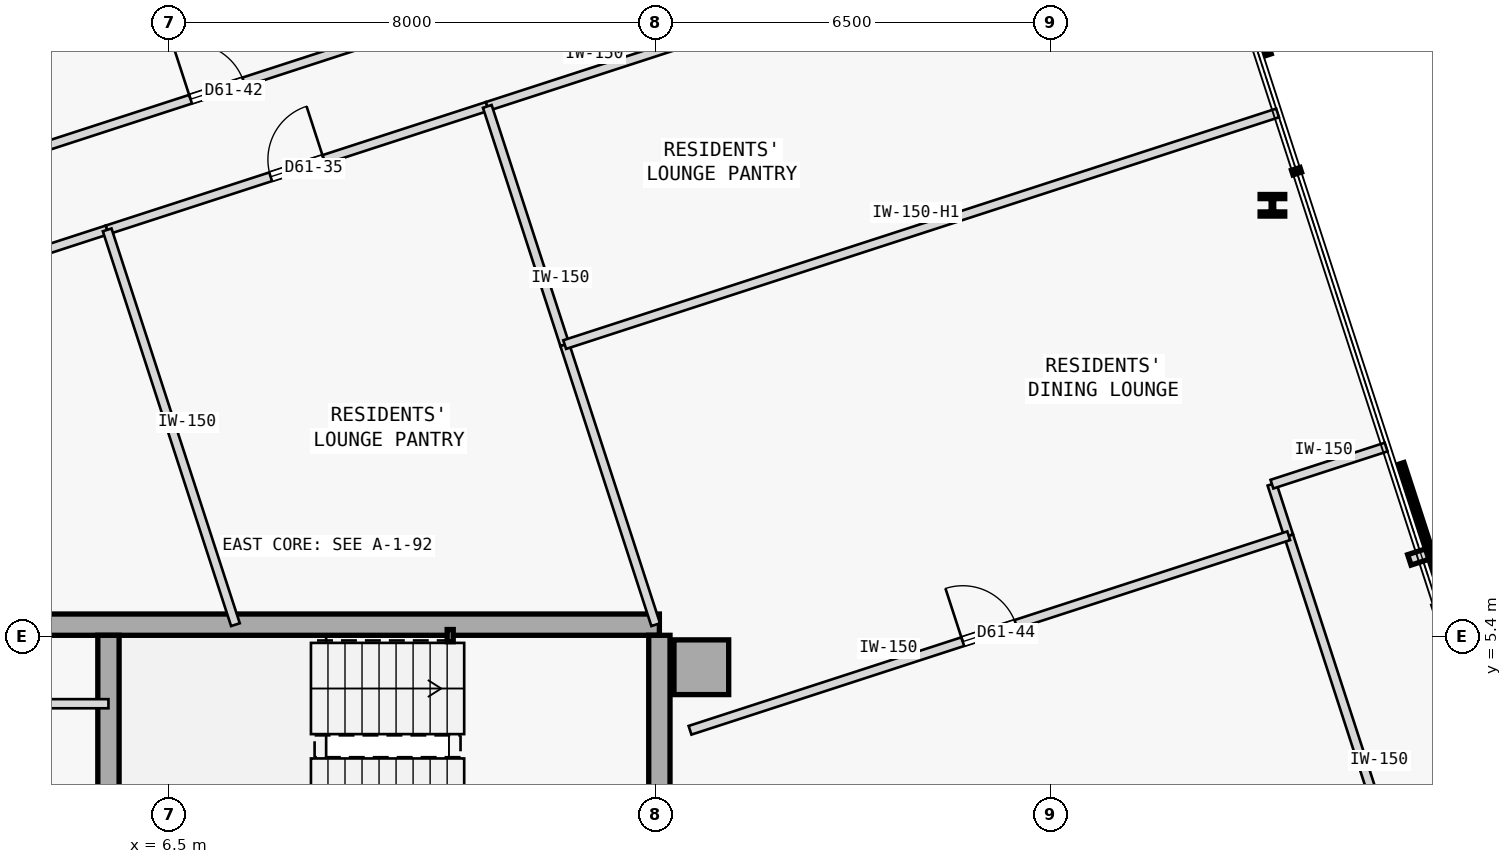
"""IFC4 building model, lengths in metres.
Left out: names, types, materials, properties, quantities, classifications, styles, units other than length and angle.
Written with IfcOpenShell. Run it as: python <this file> out.ifc"""

import sys

from ifc_helpers import new_model, si_unit, direction, frame, frame_2d, origin, origin_2d, place, context, subcontext, project, spatial, rectangle, hollow_rectangle, i_section, extrude, element, fill, save


model = new_model("IFC4")
c1 = context("Model", 3, precision=1e-05, world=origin(), true_north=direction((0.0, 1.0)))
c2 = subcontext(c1, "Body", "Model", "MODEL_VIEW")
j1 = project(units=[si_unit("LENGTHUNIT", "METRE"), si_unit("PLANEANGLEUNIT", "RADIAN")], contexts=[c1])
p1 = place(None, origin())
s1 = spatial("IfcSite", under=j1, at=p1, CompositionType="ELEMENT")
p2 = place(p1, origin())
s2 = spatial("IfcBuilding", under=s1, at=p2, CompositionType="ELEMENT")
p3 = place(p2, frame((0.0, 0.0, 231.0)))
s3 = spatial("IfcBuildingStorey", under=s2, at=p3, CompositionType="ELEMENT", Elevation=231.0)
p4 = place(p3, frame((15.25, 4.9, 0.0), z_axis=(0.0, 0.0, 1.0), x_axis=(1.0, 0.0, 0.0)))
e1 = element("IfcColumn", 1, at=p4, inside=s3, PredefinedType="COLUMN", context=c2, shape_type="SweptSolid", body=[
    extrude(rectangle(XDim=0.9, YDim=0.9, at=origin_2d()), origin(), (0.0, 0.0, 1.0), 3.35),
])
p5 = place(p3, frame((3.15, 5.6, 0.0), z_axis=(0.0, 0.0, 1.0), x_axis=(1.0, 0.0, 0.0)))
e2 = element("IfcWall", 2, at=p5, inside=s3, PredefinedType="SHEAR", context=c2, shape_type="SweptSolid", body=[
    extrude(rectangle(XDim=11.41, YDim=0.35, at=frame_2d((5.705, 0.0))), origin(), (0.0, 0.0, 1.0), 3.125),
])
p6 = place(p3, frame((14.56, -5.425, 0.0), z_axis=(0.0, 0.0, 1.0), x_axis=(0.0, 1.0, 0.0)))
e3 = element("IfcWall", 3, at=p6, inside=s3, PredefinedType="SHEAR", context=c2, shape_type="SweptSolid", body=[
    extrude(rectangle(XDim=10.85, YDim=0.35, at=frame_2d((5.425, 0.0))), origin(), (0.0, 0.0, 1.0), 3.125),
])
p7 = place(p3, frame((5.5, 2.15, 0.0), z_axis=(0.0, 0.0, 1.0), x_axis=(0.0, 1.0, 0.0)))
e4 = element("IfcWall", 4, at=p7, inside=s3, PredefinedType="SHEAR", context=c2, shape_type="SweptSolid", body=[
    extrude(rectangle(XDim=3.275, YDim=0.35, at=frame_2d((1.638, 0.0))), origin(), (0.0, 0.0, 1.0), 3.125),
])
p8 = place(p3, frame((11.12, 5.42, 0.0), z_axis=(0.0, 0.0, 1.0), x_axis=(1.0, 0.0, 0.0)))
e5 = element("IfcColumn", 5, at=p8, inside=s3, PredefinedType="COLUMN", context=c2, shape_type="SweptSolid", body=[
    extrude(hollow_rectangle(XDim=0.1, YDim=0.2, WallThickness=0.008, at=origin_2d()), origin(), (0.0, 0.0, 1.0), 3.35),
])
p9 = place(p3, frame((24.642, 12.497, 0.0), z_axis=(0.0, 0.0, 1.0), x_axis=(1.0, 0.0, 0.0)))
e6 = element("IfcColumn", 6, at=p9, inside=s3, PredefinedType="COLUMN", context=c2, shape_type="SweptSolid", body=[
    extrude(i_section(OverallWidth=0.405, OverallDepth=0.355, WebThickness=0.042, FlangeThickness=0.068, FilletRadius=0.015, at=origin_2d()), origin(), (0.0, 0.0, 1.0), 3.35),
])
p10 = place(p3, frame((3.7, 4.3, 0.0), z_axis=(0.0, 0.0, 1.0), x_axis=(1.0, 0.0, 0.0)))
e7 = element("IfcWall", 7, at=p10, inside=s3, PredefinedType="PARTITIONING", context=c2, shape_type="SweptSolid", body=[
    extrude(rectangle(XDim=1.8, YDim=0.15, at=frame_2d((0.9, 0.0))), origin(), (0.0, 0.0, 1.0), 3.125),
])
p11 = place(p3, frame((3.699, 11.514, 0.0), z_axis=(0.0, 0.0, 1.0), x_axis=(0.951069540665, 0.308976906612, 0.0)))
e8 = element("IfcWall", 8, at=p11, inside=s3, PredefinedType="PARTITIONING", context=c2, shape_type="SweptSolid", body=[
    extrude(rectangle(XDim=1.871, YDim=0.15, at=frame_2d((0.936, 0.0))), origin(), (0.0, 0.0, 1.0), 3.125),
])
p12 = place(p3, frame((5.479, 12.092, 0.0), z_axis=(0.0, 0.0, 1.0), x_axis=(0.951051809397, 0.309031480343, 0.0)))
e9 = element("IfcWall", 9, at=p12, inside=s3, PredefinedType="PARTITIONING", context=c2, shape_type="SweptSolid", body=[
    extrude(rectangle(XDim=6.573, YDim=0.15, at=frame_2d((3.287, 0.0))), origin(), (0.0, 0.0, 1.0), 3.125),
])
p13 = place(p12, frame((2.826, 0.0, 0.0)))
e10 = element("IfcOpeningElement", 10, at=p13, cuts=e9, PredefinedType="OPENING", context=c2, shape_type="SweptSolid", body=[
    extrude(rectangle(XDim=0.92, YDim=2.15, at=frame_2d((0.46, 1.075))), frame((0.0, 0.085, 0.0), z_axis=(0.0, -1.0, 0.0), x_axis=(1.0, 0.0, 0.0)), (0.0, 0.0, 1.0), 0.17),
])
p14 = place(p3, frame((3.345, 13.102, 0.0), z_axis=(0.0, 0.0, 1.0), x_axis=(0.951061984224, 0.309000165314, 0.0)))
e11 = element("IfcWall", 11, at=p14, inside=s3, PredefinedType="PARTITIONING", context=c2, shape_type="SweptSolid", body=[
    extrude(rectangle(XDim=8.29, YDim=0.15, at=frame_2d((4.145, 0.0))), origin(), (0.0, 0.0, 1.0), 3.125),
])
p15 = place(p14, frame((3.685, 0.0, 0.0)))
e12 = element("IfcOpeningElement", 12, at=p15, cuts=e11, PredefinedType="OPENING", context=c2, shape_type="SweptSolid", body=[
    extrude(rectangle(XDim=0.92, YDim=2.15, at=frame_2d((0.46, 1.075))), frame((0.0, 0.085, 0.0), z_axis=(0.0, -1.0, 0.0), x_axis=(1.0, 0.0, 0.0)), (0.0, 0.0, 1.0), 0.17),
])
p16 = place(p3, frame((27.637, -1.332, 0.0), z_axis=(0.0, 0.0, 1.0), x_axis=(-0.309040411618, 0.951048907253, 0.0)))
e13 = element("IfcWall", 13, at=p16, inside=s3, PredefinedType="PARTITIONING", context=c2, shape_type="SweptSolid", body=[
    extrude(rectangle(XDim=8.826, YDim=0.15, at=frame_2d((4.413, 0.0))), origin(), (0.0, 0.0, 1.0), 3.125),
])
p17 = place(p3, frame((24.909, 7.062, 0.0), z_axis=(0.0, 0.0, 1.0), x_axis=(-0.30899324298, 0.951064233263, 0.0)))
e14 = element("IfcWall", 14, at=p17, inside=s3, PredefinedType="PARTITIONING", context=c2, shape_type="SweptSolid", body=[
    extrude(rectangle(XDim=0.892, YDim=0.15, at=frame_2d((0.446, 0.0))), origin(), (0.0, 0.0, 1.0), 3.125),
])
p18 = place(p3, frame((24.634, 7.91, 0.0), z_axis=(0.0, 0.0, 1.0), x_axis=(0.951054051148, 0.309024581215, 0.0)))
e15 = element("IfcWall", 15, at=p18, inside=s3, PredefinedType="PARTITIONING", context=c2, shape_type="SweptSolid", body=[
    extrude(rectangle(XDim=1.975, YDim=0.15, at=frame_2d((0.988, 0.0))), origin(), (0.0, 0.0, 1.0), 3.125),
])
p19 = place(p3, frame((11.73, 14.123, 0.0), z_axis=(0.0, 0.0, 1.0), x_axis=(0.951060263663, 0.309005460926, 0.0)))
e16 = element("IfcWall", 16, at=p19, inside=s3, PredefinedType="PARTITIONING", context=c2, shape_type="SweptSolid", body=[
    extrude(rectangle(XDim=12.327, YDim=0.15, at=frame_2d((6.164, 0.0))), origin(), (0.0, 0.0, 1.0), 3.125),
])
p20 = place(p19, frame((5.704, 0.0, 0.0)))
e17 = element("IfcOpeningElement", 17, at=p20, cuts=e16, PredefinedType="OPENING", context=c2, shape_type="SweptSolid", body=[
    extrude(rectangle(XDim=0.92, YDim=2.15, at=frame_2d((0.46, 1.075))), frame((0.0, 0.085, 0.0), z_axis=(0.0, -1.0, 0.0), x_axis=(1.0, 0.0, 0.0)), (0.0, 0.0, 1.0), 0.17),
])
p21 = place(p3, frame((7.588, 5.6, 0.0), z_axis=(0.0, 0.0, 1.0), x_axis=(-0.309018946982, 0.951055881852, 0.0)))
e18 = element("IfcWall", 18, at=p21, inside=s3, PredefinedType="PARTITIONING", context=c2, shape_type="SweptSolid", body=[
    extrude(rectangle(XDim=6.826, YDim=0.15, at=frame_2d((3.413, 0.0))), origin(), (0.0, 0.0, 1.0), 3.125),
])
p22 = place(p3, frame((14.5, 5.6, 0.0), z_axis=(0.0, 0.0, 1.0), x_axis=(-0.308974360462, 0.951070367837, 0.0)))
e19 = element("IfcWall", 19, at=p22, inside=s3, PredefinedType="PARTITIONING", context=c2, shape_type="SweptSolid", body=[
    extrude(rectangle(XDim=4.843, YDim=0.15, at=frame_2d((2.421, 0.0))), origin(), (0.0, 0.0, 1.0), 3.125),
])
p23 = place(p3, frame((13.003, 10.206, 0.0), z_axis=(0.0, 0.0, 1.0), x_axis=(-0.309035144366, 0.951050618814, 0.0)))
e20 = element("IfcWall", 20, at=p23, inside=s3, PredefinedType="PARTITIONING", context=c2, shape_type="SweptSolid", body=[
    extrude(rectangle(XDim=4.119, YDim=0.15, at=frame_2d((2.06, 0.0))), origin(), (0.0, 0.0, 1.0), 3.125),
])
p24 = place(p3, frame((15.064, 3.863, 0.0), z_axis=(0.0, 0.0, 1.0), x_axis=(0.951061448945, 0.309001812827, 0.0)))
e21 = element("IfcWall", 21, at=p24, inside=s3, PredefinedType="PARTITIONING", context=c2, shape_type="SweptSolid", body=[
    extrude(rectangle(XDim=10.352, YDim=0.15, at=frame_2d((5.176, 0.0))), origin(), (0.0, 0.0, 1.0), 3.125),
])
p25 = place(p24, frame((4.716, 0.0, 0.0)))
e22 = element("IfcOpeningElement", 22, at=p25, cuts=e21, PredefinedType="OPENING", context=c2, shape_type="SweptSolid", body=[
    extrude(rectangle(XDim=0.92, YDim=2.15, at=frame_2d((0.46, 1.075))), frame((0.0, 0.085, 0.0), z_axis=(0.0, -1.0, 0.0), x_axis=(1.0, 0.0, 0.0)), (0.0, 0.0, 1.0), 0.17),
])
p26 = place(p3, frame((13.003, 10.206, 0.0), z_axis=(0.0, 0.0, 1.0), x_axis=(0.951060263663, 0.309005460926, 0.0)))
e23 = element("IfcWall", 23, at=p26, inside=s3, PredefinedType="PARTITIONING", context=c2, shape_type="SweptSolid", body=[
    extrude(rectangle(XDim=12.327, YDim=0.15, at=frame_2d((6.164, 0.0))), origin(), (0.0, 0.0, 1.0), 2.675),
])
p27 = place(p13, origin())
e24 = element("IfcDoor", 24, at=p27, inside=s3, OperationType="SINGLE_SWING_RIGHT", PredefinedType="DOOR", context=c2, shape_type="SweptSolid", body=[
    extrude(rectangle(XDim=0.92, YDim=2.15, at=frame_2d((0.46, 1.075))), frame((0.0, 0.025, 0.0), z_axis=(0.0, -1.0, 0.0), x_axis=(1.0, 0.0, 0.0)), (0.0, 0.0, 1.0), 0.05),
])
fill(e10, e24)
p28 = place(p15, origin())
e25 = element("IfcDoor", 25, at=p28, inside=s3, OperationType="SINGLE_SWING_LEFT", PredefinedType="DOOR", context=c2, shape_type="SweptSolid", body=[
    extrude(rectangle(XDim=0.92, YDim=2.15, at=frame_2d((0.46, 1.075))), frame((0.0, 0.025, 0.0), z_axis=(0.0, -1.0, 0.0), x_axis=(1.0, 0.0, 0.0)), (0.0, 0.0, 1.0), 0.05),
])
fill(e12, e25)
p29 = place(p25, origin())
e26 = element("IfcDoor", 26, at=p29, inside=s3, OperationType="SINGLE_SWING_LEFT", PredefinedType="DOOR", context=c2, shape_type="SweptSolid", body=[
    extrude(rectangle(XDim=0.92, YDim=2.15, at=frame_2d((0.46, 1.075))), frame((0.0, 0.025, 0.0), z_axis=(0.0, -1.0, 0.0), x_axis=(1.0, 0.0, 0.0)), (0.0, 0.0, 1.0), 0.05),
])
fill(e22, e26)
save(model, sys.argv[1])
